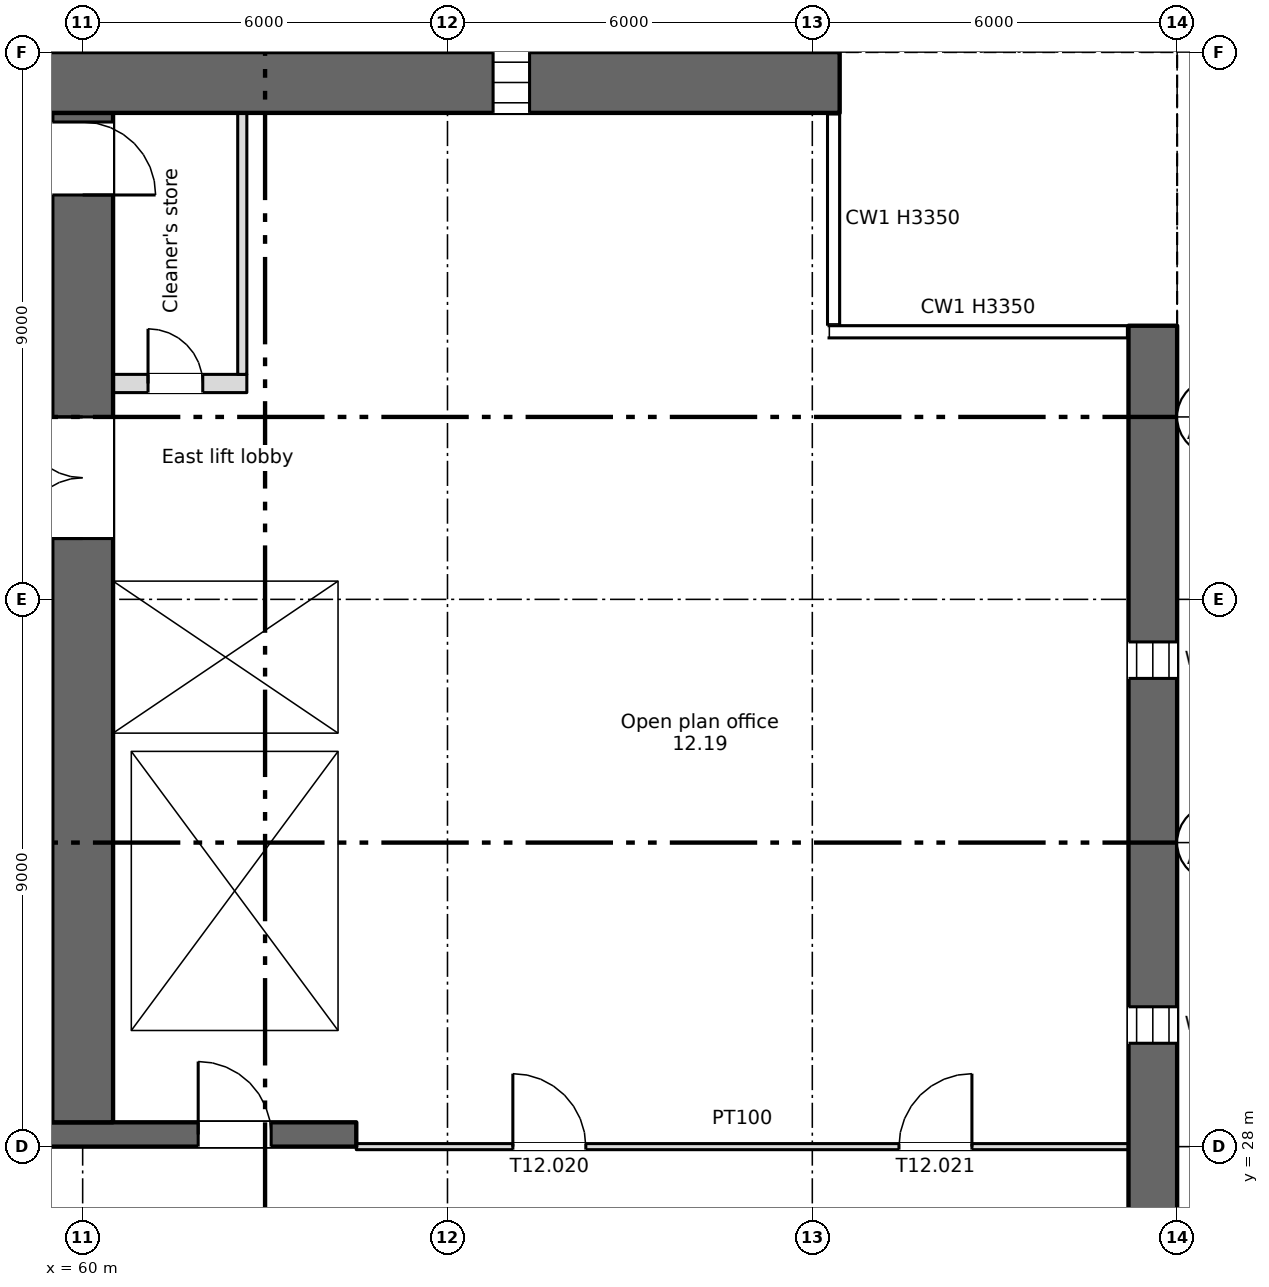
"""IFC4 building model, lengths in metres.
Left out: names, types, materials, properties, quantities, classifications, styles, units other than length and angle.
Written with IfcOpenShell. Run it as: python <this file> out.ifc"""

import sys

from ifc_helpers import new_model, si_unit, direction, frame, frame_2d, origin, place, context, subcontext, project, spatial, rectangle, extrude, element, fill, save


model = new_model("IFC4")
c1 = context("Model", 3, precision=1e-05, world=origin(), true_north=direction((0.0, 1.0)))
c2 = subcontext(c1, "Body", "Model", "MODEL_VIEW")
j1 = project(units=[si_unit("LENGTHUNIT", "METRE"), si_unit("PLANEANGLEUNIT", "RADIAN")], contexts=[c1])
p1 = place(None, origin())
s1 = spatial("IfcSite", under=j1, at=p1, CompositionType="ELEMENT")
p2 = place(p1, origin())
s2 = spatial("IfcBuilding", under=s1, at=p2, CompositionType="ELEMENT")
p3 = place(p2, frame((0.0, 0.0, 63.75)))
s3 = spatial("IfcBuildingStorey", under=s2, at=p3, CompositionType="ELEMENT", Elevation=63.75)
p4 = place(p3, frame((77.6, 4.5, 0.0), z_axis=(0.0, 0.0, 1.0), x_axis=(0.0, 1.0, 0.0)))
e1 = element("IfcWall", 1, at=p4, inside=s3, PredefinedType="SHEAR", context=c2, shape_type="SweptSolid", body=[
    extrude(rectangle(XDim=37.0, YDim=0.8, at=frame_2d((18.5, 0.0))), origin(), (0.0, 0.0, 1.0), 3.35),
])
p5 = place(p4, frame((1.2, 0.0, 0.6)))
e2 = element("IfcOpeningElement", 2, at=p5, cuts=e1, PredefinedType="OPENING", context=c2, shape_type="SweptSolid", body=[
    extrude(rectangle(XDim=0.6, YDim=2.4, at=frame_2d((0.3, 1.2))), frame((0.0, 0.41, 0.0), z_axis=(0.0, -1.0, 0.0), x_axis=(1.0, 0.0, 0.0)), (0.0, 0.0, 1.0), 0.82),
])
p6 = place(p4, frame((7.2, 0.0, 0.6)))
e3 = element("IfcOpeningElement", 3, at=p6, cuts=e1, PredefinedType="OPENING", context=c2, shape_type="SweptSolid", body=[
    extrude(rectangle(XDim=0.6, YDim=2.4, at=frame_2d((0.3, 1.2))), frame((0.0, 0.41, 0.0), z_axis=(0.0, -1.0, 0.0), x_axis=(1.0, 0.0, 0.0)), (0.0, 0.0, 1.0), 0.82),
])
p7 = place(p4, frame((13.2, 0.0, 0.6)))
e4 = element("IfcOpeningElement", 4, at=p7, cuts=e1, PredefinedType="OPENING", context=c2, shape_type="SweptSolid", body=[
    extrude(rectangle(XDim=0.6, YDim=2.4, at=frame_2d((0.3, 1.2))), frame((0.0, 0.41, 0.0), z_axis=(0.0, -1.0, 0.0), x_axis=(1.0, 0.0, 0.0)), (0.0, 0.0, 1.0), 0.82),
])
p8 = place(p4, frame((19.2, 0.0, 0.6)))
e5 = element("IfcOpeningElement", 5, at=p8, cuts=e1, PredefinedType="OPENING", context=c2, shape_type="SweptSolid", body=[
    extrude(rectangle(XDim=0.6, YDim=2.4, at=frame_2d((0.3, 1.2))), frame((0.0, 0.41, 0.0), z_axis=(0.0, -1.0, 0.0), x_axis=(1.0, 0.0, 0.0)), (0.0, 0.0, 1.0), 0.82),
])
p9 = place(p4, frame((25.2, 0.0, 0.6)))
e6 = element("IfcOpeningElement", 6, at=p9, cuts=e1, PredefinedType="OPENING", context=c2, shape_type="SweptSolid", body=[
    extrude(rectangle(XDim=0.6, YDim=2.4, at=frame_2d((0.3, 1.2))), frame((0.0, 0.41, 0.0), z_axis=(0.0, -1.0, 0.0), x_axis=(1.0, 0.0, 0.0)), (0.0, 0.0, 1.0), 0.82),
])
p10 = place(p4, frame((31.2, 0.0, 0.6)))
e7 = element("IfcOpeningElement", 7, at=p10, cuts=e1, PredefinedType="OPENING", context=c2, shape_type="SweptSolid", body=[
    extrude(rectangle(XDim=0.6, YDim=2.4, at=frame_2d((0.3, 1.2))), frame((0.0, 0.41, 0.0), z_axis=(0.0, -1.0, 0.0), x_axis=(1.0, 0.0, 0.0)), (0.0, 0.0, 1.0), 0.82),
])
p11 = place(p3, frame((5.55, 45.5, 0.0), z_axis=(0.0, 0.0, 1.0), x_axis=(1.0, 0.0, 0.0)))
e8 = element("IfcWall", 8, at=p11, inside=s3, PredefinedType="SHEAR", context=c2, shape_type="SweptSolid", body=[
    extrude(rectangle(XDim=66.9, YDim=1.0, at=frame_2d((33.45, 0.0))), origin(), (0.0, 0.0, 1.0), 3.35),
])
p12 = place(p11, frame((1.2, 0.0, 0.6)))
e9 = element("IfcOpeningElement", 9, at=p12, cuts=e8, PredefinedType="OPENING", context=c2, shape_type="SweptSolid", body=[
    extrude(rectangle(XDim=0.6, YDim=2.4, at=frame_2d((0.3, 1.2))), frame((0.0, 0.51, 0.0), z_axis=(0.0, -1.0, 0.0), x_axis=(1.0, 0.0, 0.0)), (0.0, 0.0, 1.0), 1.02),
])
p13 = place(p11, frame((7.2, 0.0, 0.6)))
e10 = element("IfcOpeningElement", 10, at=p13, cuts=e8, PredefinedType="OPENING", context=c2, shape_type="SweptSolid", body=[
    extrude(rectangle(XDim=0.6, YDim=2.4, at=frame_2d((0.3, 1.2))), frame((0.0, 0.51, 0.0), z_axis=(0.0, -1.0, 0.0), x_axis=(1.0, 0.0, 0.0)), (0.0, 0.0, 1.0), 1.02),
])
p14 = place(p11, frame((61.2, 0.0, 0.6)))
e11 = element("IfcOpeningElement", 11, at=p14, cuts=e8, PredefinedType="OPENING", context=c2, shape_type="SweptSolid", body=[
    extrude(rectangle(XDim=0.6, YDim=2.4, at=frame_2d((0.3, 1.2))), frame((0.0, 0.51, 0.0), z_axis=(0.0, -1.0, 0.0), x_axis=(1.0, 0.0, 0.0)), (0.0, 0.0, 1.0), 1.02),
])
p15 = place(p3, frame((6.7, 28.2, 0.0), z_axis=(0.0, 0.0, 1.0), x_axis=(1.0, 0.0, 0.0)))
e12 = element("IfcWall", 12, at=p15, inside=s3, PredefinedType="SHEAR", context=c2, shape_type="SweptSolid", body=[
    extrude(rectangle(XDim=57.8, YDim=0.4, at=frame_2d((28.9, 0.0))), origin(), (0.0, 0.0, 1.0), 3.35),
])
p16 = place(p15, frame((12.562, 0.0, 0.0)))
e13 = element("IfcOpeningElement", 13, at=p16, cuts=e12, PredefinedType="OPENING", context=c2, shape_type="SweptSolid", body=[
    extrude(rectangle(XDim=0.9, YDim=2.1, at=frame_2d((0.45, 1.05))), frame((0.0, 0.21, 0.0), z_axis=(0.0, -1.0, 0.0), x_axis=(1.0, 0.0, 0.0)), (0.0, 0.0, 1.0), 0.42),
])
p17 = place(p15, frame((15.137, 0.0, 0.0)))
e14 = element("IfcOpeningElement", 14, at=p17, cuts=e12, PredefinedType="OPENING", context=c2, shape_type="SweptSolid", body=[
    extrude(rectangle(XDim=0.9, YDim=2.1, at=frame_2d((0.45, 1.05))), frame((0.0, 0.21, 0.0), z_axis=(0.0, -1.0, 0.0), x_axis=(1.0, 0.0, 0.0)), (0.0, 0.0, 1.0), 0.42),
])
p18 = place(p15, frame((49.85, 0.0, 0.0)))
e15 = element("IfcOpeningElement", 15, at=p18, cuts=e12, PredefinedType="OPENING", context=c2, shape_type="SweptSolid", body=[
    extrude(rectangle(XDim=0.9, YDim=2.1, at=frame_2d((0.45, 1.05))), frame((0.0, 0.21, 0.0), z_axis=(0.0, -1.0, 0.0), x_axis=(1.0, 0.0, 0.0)), (0.0, 0.0, 1.0), 0.42),
])
p19 = place(p15, frame((0.562, 0.0, 0.0)))
e16 = element("IfcOpeningElement", 16, at=p19, cuts=e12, PredefinedType="OPENING", context=c2, shape_type="SweptSolid", body=[
    extrude(rectangle(XDim=0.9, YDim=2.1, at=frame_2d((0.45, 1.05))), frame((0.0, 0.21, 0.0), z_axis=(0.0, -1.0, 0.0), x_axis=(1.0, 0.0, 0.0)), (0.0, 0.0, 1.0), 0.42),
])
p20 = place(p15, frame((2.137, 0.0, 0.0)))
e17 = element("IfcOpeningElement", 17, at=p20, cuts=e12, PredefinedType="OPENING", context=c2, shape_type="SweptSolid", body=[
    extrude(rectangle(XDim=0.9, YDim=2.1, at=frame_2d((0.45, 1.05))), frame((0.0, 0.21, 0.0), z_axis=(0.0, -1.0, 0.0), x_axis=(1.0, 0.0, 0.0)), (0.0, 0.0, 1.0), 0.42),
])
p21 = place(p15, frame((4.7, 0.0, 0.0)))
e18 = element("IfcOpeningElement", 18, at=p21, cuts=e12, PredefinedType="OPENING", context=c2, shape_type="SweptSolid", body=[
    extrude(rectangle(XDim=1.2, YDim=2.1, at=frame_2d((0.6, 1.05))), frame((0.0, 0.21, 0.0), z_axis=(0.0, -1.0, 0.0), x_axis=(1.0, 0.0, 0.0)), (0.0, 0.0, 1.0), 0.42),
])
p22 = place(p15, frame((31.7, 0.0, 0.0)))
e19 = element("IfcOpeningElement", 19, at=p22, cuts=e12, PredefinedType="OPENING", context=c2, shape_type="SweptSolid", body=[
    extrude(rectangle(XDim=1.2, YDim=2.1, at=frame_2d((0.6, 1.05))), frame((0.0, 0.21, 0.0), z_axis=(0.0, -1.0, 0.0), x_axis=(1.0, 0.0, 0.0)), (0.0, 0.0, 1.0), 0.42),
])
p23 = place(p15, frame((55.2, 0.0, 0.0)))
e20 = element("IfcOpeningElement", 20, at=p23, cuts=e12, PredefinedType="OPENING", context=c2, shape_type="SweptSolid", body=[
    extrude(rectangle(XDim=1.2, YDim=2.1, at=frame_2d((0.6, 1.05))), frame((0.0, 0.21, 0.0), z_axis=(0.0, -1.0, 0.0), x_axis=(1.0, 0.0, 0.0)), (0.0, 0.0, 1.0), 0.42),
])
p24 = place(p15, frame((21.7, 0.0, 0.0)))
e21 = element("IfcOpeningElement", 21, at=p24, cuts=e12, PredefinedType="OPENING", context=c2, shape_type="SweptSolid", body=[
    extrude(rectangle(XDim=1.2, YDim=2.1, at=frame_2d((0.6, 1.05))), frame((0.0, 0.21, 0.0), z_axis=(0.0, -1.0, 0.0), x_axis=(1.0, 0.0, 0.0)), (0.0, 0.0, 1.0), 0.42),
])
p25 = place(p15, frame((41.7, 0.0, 0.0)))
e22 = element("IfcOpeningElement", 22, at=p25, cuts=e12, PredefinedType="OPENING", context=c2, shape_type="SweptSolid", body=[
    extrude(rectangle(XDim=1.2, YDim=2.1, at=frame_2d((0.6, 1.05))), frame((0.0, 0.21, 0.0), z_axis=(0.0, -1.0, 0.0), x_axis=(1.0, 0.0, 0.0)), (0.0, 0.0, 1.0), 0.42),
])
p26 = place(p15, frame((24.85, 0.0, 0.0)))
e23 = element("IfcOpeningElement", 23, at=p26, cuts=e12, PredefinedType="OPENING", context=c2, shape_type="SweptSolid", body=[
    extrude(rectangle(XDim=2.4, YDim=2.1, at=frame_2d((1.2, 1.05))), frame((0.0, 0.21, 0.0), z_axis=(0.0, -1.0, 0.0), x_axis=(1.0, 0.0, 0.0)), (0.0, 0.0, 1.0), 0.42),
])
p27 = place(p15, frame((37.35, 0.0, 0.0)))
e24 = element("IfcOpeningElement", 24, at=p27, cuts=e12, PredefinedType="OPENING", context=c2, shape_type="SweptSolid", body=[
    extrude(rectangle(XDim=2.4, YDim=2.1, at=frame_2d((1.2, 1.05))), frame((0.0, 0.21, 0.0), z_axis=(0.0, -1.0, 0.0), x_axis=(1.0, 0.0, 0.0)), (0.0, 0.0, 1.0), 0.42),
])
p28 = place(p15, frame((7.85, 0.0, 0.0)))
e25 = element("IfcOpeningElement", 25, at=p28, cuts=e12, PredefinedType="OPENING", context=c2, shape_type="SweptSolid", body=[
    extrude(rectangle(XDim=2.4, YDim=2.1, at=frame_2d((1.2, 1.05))), frame((0.0, 0.21, 0.0), z_axis=(0.0, -1.0, 0.0), x_axis=(1.0, 0.0, 0.0)), (0.0, 0.0, 1.0), 0.42),
])
p29 = place(p15, frame((28.85, 0.0, 0.0)))
e26 = element("IfcOpeningElement", 26, at=p29, cuts=e12, PredefinedType="OPENING", context=c2, shape_type="SweptSolid", body=[
    extrude(rectangle(XDim=0.9, YDim=2.1, at=frame_2d((0.45, 1.05))), frame((0.0, 0.21, 0.0), z_axis=(0.0, -1.0, 0.0), x_axis=(1.0, 0.0, 0.0)), (0.0, 0.0, 1.0), 0.42),
])
p30 = place(p15, frame((34.85, 0.0, 0.0)))
e27 = element("IfcOpeningElement", 27, at=p30, cuts=e12, PredefinedType="OPENING", context=c2, shape_type="SweptSolid", body=[
    extrude(rectangle(XDim=0.9, YDim=2.1, at=frame_2d((0.45, 1.05))), frame((0.0, 0.21, 0.0), z_axis=(0.0, -1.0, 0.0), x_axis=(1.0, 0.0, 0.0)), (0.0, 0.0, 1.0), 0.42),
])
p31 = place(p3, frame((64.35, 34.8, 0.0), z_axis=(0.0, 0.0, 1.0), x_axis=(0.0, 1.0, 0.0)))
e28 = element("IfcWall", 28, at=p31, inside=s3, PredefinedType="SHEAR", context=c2, shape_type="SweptSolid", body=[
    extrude(rectangle(XDim=10.2, YDim=0.3, at=frame_2d((5.1, 0.0))), origin(), (0.0, 0.0, 1.0), 3.35),
])
p32 = place(p3, frame((60.0, 28.4, 0.0), z_axis=(0.0, 0.0, 1.0), x_axis=(0.0, 1.0, 0.0)))
e29 = element("IfcWall", 29, at=p32, inside=s3, PredefinedType="SHEAR", context=c2, shape_type="SweptSolid", body=[
    extrude(rectangle(XDim=16.6, YDim=1.0, at=frame_2d((8.3, 0.0))), origin(), (0.0, 0.0, 1.0), 3.35),
])
p33 = place(p32, frame((9.6, 0.0, 0.0)))
e30 = element("IfcOpeningElement", 30, at=p33, cuts=e29, PredefinedType="OPENING", context=c2, shape_type="SweptSolid", body=[
    extrude(rectangle(XDim=2.0, YDim=2.1, at=frame_2d((1.0, 1.05))), frame((0.0, 0.51, 0.0), z_axis=(0.0, -1.0, 0.0), x_axis=(1.0, 0.0, 0.0)), (0.0, 0.0, 1.0), 1.02),
])
p34 = place(p32, frame((15.25, 0.0, 0.0)))
e31 = element("IfcOpeningElement", 31, at=p34, cuts=e29, PredefinedType="OPENING", context=c2, shape_type="SweptSolid", body=[
    extrude(rectangle(XDim=1.2, YDim=2.1, at=frame_2d((0.6, 1.05))), frame((0.0, 0.51, 0.0), z_axis=(0.0, -1.0, 0.0), x_axis=(1.0, 0.0, 0.0)), (0.0, 0.0, 1.0), 1.02),
])
for number, where, z_axis, x_axis in (
    (32, (60.65, 28.4, 0.0), (0.0, 0.0, 1.0), (0.0, 1.0, 0.0)),
    (33, (64.35, 28.4, 0.0), (0.0, 0.0, 1.0), (0.0, 1.0, 0.0)),
):
    element("IfcWall", number, at=place(p3, frame(where, z_axis=z_axis, x_axis=x_axis)), inside=s3, PredefinedType="SHEAR", context=c2, shape_type="SweptSolid", body=[
        extrude(rectangle(XDim=6.1, YDim=0.3, at=frame_2d((3.05, 0.0))), origin(), (0.0, 0.0, 1.0), 3.35),
    ])
p35 = place(p3, frame((47.3, 34.65, 0.0), z_axis=(0.0, 0.0, 1.0), x_axis=(1.0, 0.0, 0.0)))
e34 = element("IfcWall", 34, at=p35, inside=s3, PredefinedType="SHEAR", context=c2, shape_type="SweptSolid", body=[
    extrude(rectangle(XDim=12.2, YDim=0.3, at=frame_2d((6.1, 0.0))), origin(), (0.0, 0.0, 1.0), 3.35),
])
p36 = place(p35, frame((1.3, 0.0, 0.0)))
e35 = element("IfcOpeningElement", 35, at=p36, cuts=e34, PredefinedType="OPENING", context=c2, shape_type="SweptSolid", body=[
    extrude(rectangle(XDim=1.1, YDim=2.1, at=frame_2d((0.55, 1.05))), frame((0.0, 0.16, 0.0), z_axis=(0.0, -1.0, 0.0), x_axis=(1.0, 0.0, 0.0)), (0.0, 0.0, 1.0), 0.32),
])
p37 = place(p3, frame((60.5, 34.65, 0.0), z_axis=(0.0, 0.0, 1.0), x_axis=(1.0, 0.0, 0.0)))
e36 = element("IfcWall", 36, at=p37, inside=s3, PredefinedType="SHEAR", context=c2, shape_type="SweptSolid", body=[
    extrude(rectangle(XDim=4.0, YDim=0.3, at=frame_2d((2.0, 0.0))), origin(), (0.0, 0.0, 1.0), 3.35),
])
p38 = place(p3, frame((60.5, 37.45, 0.0), z_axis=(0.0, 0.0, 1.0), x_axis=(1.0, 0.0, 0.0)))
e37 = element("IfcWall", 37, at=p38, inside=s3, PredefinedType="SHEAR", context=c2, shape_type="SweptSolid", body=[
    extrude(rectangle(XDim=3.7, YDim=0.3, at=frame_2d((1.85, 0.0))), origin(), (0.0, 0.0, 1.0), 3.35),
])
p39 = place(p38, frame((1.3, 0.0, 0.0)))
e38 = element("IfcOpeningElement", 38, at=p39, cuts=e37, PredefinedType="OPENING", context=c2, shape_type="SweptSolid", body=[
    extrude(rectangle(XDim=1.1, YDim=2.1, at=frame_2d((0.55, 1.05))), frame((0.0, 0.16, 0.0), z_axis=(0.0, -1.0, 0.0), x_axis=(1.0, 0.0, 0.0)), (0.0, 0.0, 1.0), 0.32),
])
p40 = place(p3, frame((60.5, 40.55, 0.0), z_axis=(0.0, 0.0, 1.0), x_axis=(1.0, 0.0, 0.0)))
e39 = element("IfcWall", 39, at=p40, inside=s3, PredefinedType="PARTITIONING", context=c2, shape_type="SweptSolid", body=[
    extrude(rectangle(XDim=2.2, YDim=0.3, at=frame_2d((1.1, 0.0))), origin(), (0.0, 0.0, 1.0), 3.35),
])
p41 = place(p40, frame((0.575, 0.0, 0.0)))
e40 = element("IfcOpeningElement", 40, at=p41, cuts=e39, PredefinedType="OPENING", context=c2, shape_type="SweptSolid", body=[
    extrude(rectangle(XDim=0.9, YDim=2.1, at=frame_2d((0.45, 1.05))), frame((0.0, 0.16, 0.0), z_axis=(0.0, -1.0, 0.0), x_axis=(1.0, 0.0, 0.0)), (0.0, 0.0, 1.0), 0.32),
])
p42 = place(p3, frame((62.625, 40.7, 0.0), z_axis=(0.0, 0.0, 1.0), x_axis=(0.0, 1.0, 0.0)))
e41 = element("IfcWall", 41, at=p42, inside=s3, PredefinedType="PARTITIONING", context=c2, shape_type="SweptSolid", body=[
    extrude(rectangle(XDim=4.3, YDim=0.15, at=frame_2d((2.15, 0.0))), origin(), (0.0, 0.0, 1.0), 3.35),
])
p43 = place(p3, frame((64.5, 28.0, 0.0), z_axis=(0.0, 0.0, 1.0), x_axis=(1.0, 0.0, 0.0)))
e42 = element("IfcWall", 42, at=p43, inside=s3, PredefinedType="PARTITIONING", context=c2, shape_type="SweptSolid", body=[
    extrude(rectangle(XDim=12.7, YDim=0.1, at=frame_2d((6.35, 0.0))), origin(), (0.0, 0.0, 1.0), 3.35),
])
p44 = place(p43, frame((2.575, 0.0, 0.0)))
e43 = element("IfcOpeningElement", 43, at=p44, cuts=e42, PredefinedType="OPENING", context=c2, shape_type="SweptSolid", body=[
    extrude(rectangle(XDim=1.2, YDim=2.1, at=frame_2d((0.6, 1.05))), frame((0.0, 0.06, 0.0), z_axis=(0.0, -1.0, 0.0), x_axis=(1.0, 0.0, 0.0)), (0.0, 0.0, 1.0), 0.12),
])
p45 = place(p43, frame((8.925, 0.0, 0.0)))
e44 = element("IfcOpeningElement", 44, at=p45, cuts=e42, PredefinedType="OPENING", context=c2, shape_type="SweptSolid", body=[
    extrude(rectangle(XDim=1.2, YDim=2.1, at=frame_2d((0.6, 1.05))), frame((0.0, 0.06, 0.0), z_axis=(0.0, -1.0, 0.0), x_axis=(1.0, 0.0, 0.0)), (0.0, 0.0, 1.0), 0.12),
])
p46 = place(p14, origin())
e45 = element("IfcWindow", 45, at=p46, inside=s3, PartitioningType="SINGLE_PANEL", PredefinedType="WINDOW", context=c2, shape_type="SweptSolid", body=[
    extrude(rectangle(XDim=0.6, YDim=2.4, at=frame_2d((0.3, 1.2))), frame((0.0, 0.03, 0.0), z_axis=(0.0, -1.0, 0.0), x_axis=(1.0, 0.0, 0.0)), (0.0, 0.0, 1.0), 0.06),
])
fill(e11, e45)
p47 = place(p9, origin())
e46 = element("IfcWindow", 46, at=p47, inside=s3, PartitioningType="SINGLE_PANEL", PredefinedType="WINDOW", context=c2, shape_type="SweptSolid", body=[
    extrude(rectangle(XDim=0.6, YDim=2.4, at=frame_2d((0.3, 1.2))), frame((0.0, 0.03, 0.0), z_axis=(0.0, -1.0, 0.0), x_axis=(1.0, 0.0, 0.0)), (0.0, 0.0, 1.0), 0.06),
])
fill(e6, e46)
p48 = place(p10, origin())
e47 = element("IfcWindow", 47, at=p48, inside=s3, PartitioningType="SINGLE_PANEL", PredefinedType="WINDOW", context=c2, shape_type="SweptSolid", body=[
    extrude(rectangle(XDim=0.6, YDim=2.4, at=frame_2d((0.3, 1.2))), frame((0.0, 0.03, 0.0), z_axis=(0.0, -1.0, 0.0), x_axis=(1.0, 0.0, 0.0)), (0.0, 0.0, 1.0), 0.06),
])
fill(e7, e47)
p49 = place(p41, origin())
e48 = element("IfcDoor", 48, at=p49, inside=s3, OperationType="SINGLE_SWING_LEFT", PredefinedType="DOOR", context=c2, shape_type="SweptSolid", body=[
    extrude(rectangle(XDim=0.9, YDim=2.1, at=frame_2d((0.45, 1.05))), frame((0.0, 0.025, 0.0), z_axis=(0.0, -1.0, 0.0), x_axis=(1.0, 0.0, 0.0)), (0.0, 0.0, 1.0), 0.05),
])
fill(e40, e48)
p50 = place(p39, origin())
e49 = element("IfcDoor", 49, at=p50, inside=s3, OperationType="SLIDING_TO_LEFT", PredefinedType="DOOR", context=c2, shape_type="SweptSolid", body=[
    extrude(rectangle(XDim=1.1, YDim=2.1, at=frame_2d((0.55, 1.05))), frame((0.0, 0.025, 0.0), z_axis=(0.0, -1.0, 0.0), x_axis=(1.0, 0.0, 0.0)), (0.0, 0.0, 1.0), 0.05),
])
fill(e38, e49)
p51 = place(p23, origin())
e50 = element("IfcDoor", 50, at=p51, inside=s3, OperationType="SINGLE_SWING_LEFT", PredefinedType="DOOR", context=c2, shape_type="SweptSolid", body=[
    extrude(rectangle(XDim=1.2, YDim=2.1, at=frame_2d((0.6, 1.05))), frame((0.0, 0.025, 0.0), z_axis=(0.0, -1.0, 0.0), x_axis=(1.0, 0.0, 0.0)), (0.0, 0.0, 1.0), 0.05),
])
fill(e20, e50)
p52 = place(p33, origin())
e51 = element("IfcDoor", 51, at=p52, inside=s3, OperationType="DOUBLE_DOOR_SINGLE_SWING", PredefinedType="DOOR", context=c2, shape_type="SweptSolid", body=[
    extrude(rectangle(XDim=2.0, YDim=2.1, at=frame_2d((1.0, 1.05))), frame((0.0, 0.025, 0.0), z_axis=(0.0, -1.0, 0.0), x_axis=(1.0, 0.0, 0.0)), (0.0, 0.0, 1.0), 0.05),
])
fill(e30, e51)
p53 = place(p34, origin())
e52 = element("IfcDoor", 52, at=p53, inside=s3, OperationType="SINGLE_SWING_LEFT", PredefinedType="DOOR", context=c2, shape_type="SweptSolid", body=[
    extrude(rectangle(XDim=1.2, YDim=2.1, at=frame_2d((0.6, 1.05))), frame((0.0, 0.025, 0.0), z_axis=(0.0, -1.0, 0.0), x_axis=(1.0, 0.0, 0.0)), (0.0, 0.0, 1.0), 0.05),
])
fill(e31, e52)
p54 = place(p44, origin())
e53 = element("IfcDoor", 53, at=p54, inside=s3, OperationType="SINGLE_SWING_LEFT", PredefinedType="DOOR", context=c2, shape_type="SweptSolid", body=[
    extrude(rectangle(XDim=1.2, YDim=2.1, at=frame_2d((0.6, 1.05))), frame((0.0, 0.025, 0.0), z_axis=(0.0, -1.0, 0.0), x_axis=(1.0, 0.0, 0.0)), (0.0, 0.0, 1.0), 0.05),
])
fill(e43, e53)
p55 = place(p45, origin())
e54 = element("IfcDoor", 54, at=p55, inside=s3, OperationType="SINGLE_SWING_RIGHT", PredefinedType="DOOR", context=c2, shape_type="SweptSolid", body=[
    extrude(rectangle(XDim=1.2, YDim=2.1, at=frame_2d((0.6, 1.05))), frame((0.0, 0.025, 0.0), z_axis=(0.0, -1.0, 0.0), x_axis=(1.0, 0.0, 0.0)), (0.0, 0.0, 1.0), 0.05),
])
fill(e44, e54)
save(model, sys.argv[1])
